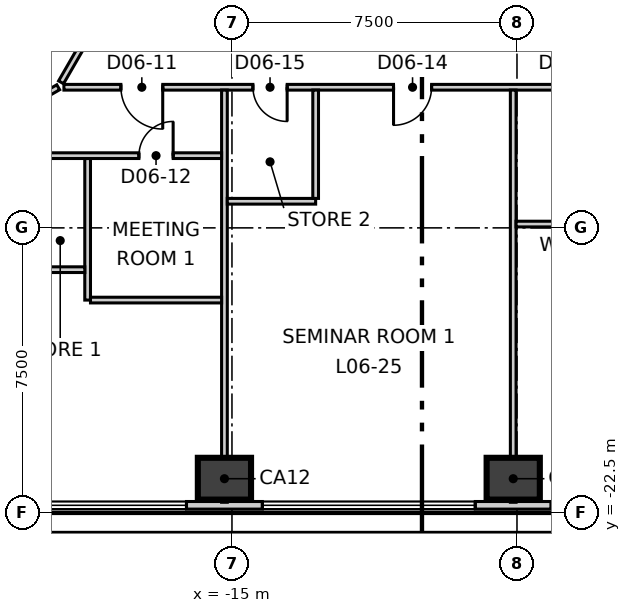
"""IFC4 building model, lengths in metres.
Left out: names, types, materials, properties, quantities, classifications, styles, units other than length and angle.
Written with IfcOpenShell. Run it as: python <this file> out.ifc"""

import sys

from ifc_helpers import new_model, si_unit, direction, frame, frame_2d, origin, origin_2d, place, context, subcontext, project, spatial, rectangle, extrude, element, fill, save


model = new_model("IFC4")
c1 = context("Model", 3, precision=1e-05, world=origin(), true_north=direction((0.0, 1.0)))
c2 = subcontext(c1, "Body", "Model", "MODEL_VIEW")
j1 = project(units=[si_unit("LENGTHUNIT", "METRE"), si_unit("PLANEANGLEUNIT", "RADIAN")], contexts=[c1])
p1 = place(None, origin())
s1 = spatial("IfcSite", under=j1, at=p1, CompositionType="ELEMENT")
p2 = place(p1, origin())
s2 = spatial("IfcBuilding", under=s1, at=p2, CompositionType="ELEMENT")
p3 = place(p2, frame((0.0, 0.0, 35.3)))
s3 = spatial("IfcBuildingStorey", under=s2, at=p3, CompositionType="ELEMENT", Elevation=35.3)
for number, where, z_axis, x_axis in (
    (1, (-15.198, -21.6, -0.3), (0.0, 0.0, 1.0), (1.0, 0.0, 0.0)),
    (2, (-7.599, -21.6, -0.3), (0.0, 0.0, 1.0), (1.0, 0.0, 0.0)),
):
    element("IfcColumn", number, at=place(p3, frame(where, z_axis=z_axis, x_axis=x_axis)), inside=s3, PredefinedType="COLUMN", context=c2, shape_type="SweptSolid", body=[
        extrude(rectangle(XDim=1.4, YDim=1.1, at=origin_2d()), origin(), (0.0, 0.0, 1.0), 4.0),
    ])
p4 = place(p3, frame((-3.462, 38.603, 0.0), z_axis=(0.0, 0.0, 1.0), x_axis=(-0.500012207976, -0.866018355391, 0.0)))
e3 = element("IfcWall", 3, at=p4, inside=s3, PredefinedType="ELEMENTEDWALL", context=c2, shape_type="SweptSolid", body=[
    extrude(rectangle(XDim=63.381, YDim=0.2, at=frame_2d((31.69, 0.0))), origin(), (0.0, 0.0, 1.0), 3.7),
])
p5 = place(p4, frame((2.302, 0.0, 0.9)))
e4 = element("IfcOpeningElement", 4, at=p5, cuts=e3, PredefinedType="OPENING", context=c2, shape_type="SweptSolid", body=[
    extrude(rectangle(XDim=5.6, YDim=2.5, at=frame_2d((2.8, 1.25))), frame((0.0, 0.11, 0.0), z_axis=(0.0, -1.0, 0.0), x_axis=(1.0, 0.0, 0.0)), (0.0, 0.0, 1.0), 0.22),
])
p6 = place(p4, frame((9.902, 0.0, 0.9)))
e5 = element("IfcOpeningElement", 5, at=p6, cuts=e3, PredefinedType="OPENING", context=c2, shape_type="SweptSolid", body=[
    extrude(rectangle(XDim=5.6, YDim=2.5, at=frame_2d((2.8, 1.25))), frame((0.0, 0.11, 0.0), z_axis=(0.0, -1.0, 0.0), x_axis=(1.0, 0.0, 0.0)), (0.0, 0.0, 1.0), 0.22),
])
p7 = place(p4, frame((17.501, 0.0, 0.9)))
e6 = element("IfcOpeningElement", 6, at=p7, cuts=e3, PredefinedType="OPENING", context=c2, shape_type="SweptSolid", body=[
    extrude(rectangle(XDim=5.6, YDim=2.5, at=frame_2d((2.8, 1.25))), frame((0.0, 0.11, 0.0), z_axis=(0.0, -1.0, 0.0), x_axis=(1.0, 0.0, 0.0)), (0.0, 0.0, 1.0), 0.22),
])
p8 = place(p4, frame((25.1, 0.0, 0.9)))
e7 = element("IfcOpeningElement", 7, at=p8, cuts=e3, PredefinedType="OPENING", context=c2, shape_type="SweptSolid", body=[
    extrude(rectangle(XDim=5.6, YDim=2.5, at=frame_2d((2.8, 1.25))), frame((0.0, 0.11, 0.0), z_axis=(0.0, -1.0, 0.0), x_axis=(1.0, 0.0, 0.0)), (0.0, 0.0, 1.0), 0.22),
])
p9 = place(p4, frame((32.7, 0.0, 0.9)))
e8 = element("IfcOpeningElement", 8, at=p9, cuts=e3, PredefinedType="OPENING", context=c2, shape_type="SweptSolid", body=[
    extrude(rectangle(XDim=5.6, YDim=2.5, at=frame_2d((2.8, 1.25))), frame((0.0, 0.11, 0.0), z_axis=(0.0, -1.0, 0.0), x_axis=(1.0, 0.0, 0.0)), (0.0, 0.0, 1.0), 0.22),
])
p10 = place(p4, frame((40.299, 0.0, 0.9)))
e9 = element("IfcOpeningElement", 9, at=p10, cuts=e3, PredefinedType="OPENING", context=c2, shape_type="SweptSolid", body=[
    extrude(rectangle(XDim=5.6, YDim=2.5, at=frame_2d((2.8, 1.25))), frame((0.0, 0.11, 0.0), z_axis=(0.0, -1.0, 0.0), x_axis=(1.0, 0.0, 0.0)), (0.0, 0.0, 1.0), 0.22),
])
p11 = place(p4, frame((47.899, 0.0, 0.9)))
e10 = element("IfcOpeningElement", 10, at=p11, cuts=e3, PredefinedType="OPENING", context=c2, shape_type="SweptSolid", body=[
    extrude(rectangle(XDim=5.6, YDim=2.5, at=frame_2d((2.8, 1.25))), frame((0.0, 0.11, 0.0), z_axis=(0.0, -1.0, 0.0), x_axis=(1.0, 0.0, 0.0)), (0.0, 0.0, 1.0), 0.22),
])
p12 = place(p4, frame((55.498, 0.0, 0.9)))
e11 = element("IfcOpeningElement", 11, at=p12, cuts=e3, PredefinedType="OPENING", context=c2, shape_type="SweptSolid", body=[
    extrude(rectangle(XDim=5.6, YDim=2.5, at=frame_2d((2.8, 1.25))), frame((0.0, 0.11, 0.0), z_axis=(0.0, -1.0, 0.0), x_axis=(1.0, 0.0, 0.0)), (0.0, 0.0, 1.0), 0.22),
])
p13 = place(p3, frame((-31.7, -22.3, 0.0), z_axis=(0.0, 0.0, 1.0), x_axis=(1.0, 0.0, 0.0)))
e12 = element("IfcWall", 12, at=p13, inside=s3, PredefinedType="ELEMENTEDWALL", context=c2, shape_type="SweptSolid", body=[
    extrude(rectangle(XDim=63.38, YDim=0.2, at=frame_2d((31.69, 0.0))), origin(), (0.0, 0.0, 1.0), 3.7),
])
p14 = place(p13, frame((2.303, 0.0, 0.9)))
e13 = element("IfcOpeningElement", 13, at=p14, cuts=e12, PredefinedType="OPENING", context=c2, shape_type="SweptSolid", body=[
    extrude(rectangle(XDim=5.6, YDim=2.5, at=frame_2d((2.8, 1.25))), frame((0.0, 0.11, 0.0), z_axis=(0.0, -1.0, 0.0), x_axis=(1.0, 0.0, 0.0)), (0.0, 0.0, 1.0), 0.22),
])
p15 = place(p13, frame((9.902, 0.0, 0.9)))
e14 = element("IfcOpeningElement", 14, at=p15, cuts=e12, PredefinedType="OPENING", context=c2, shape_type="SweptSolid", body=[
    extrude(rectangle(XDim=5.6, YDim=2.5, at=frame_2d((2.8, 1.25))), frame((0.0, 0.11, 0.0), z_axis=(0.0, -1.0, 0.0), x_axis=(1.0, 0.0, 0.0)), (0.0, 0.0, 1.0), 0.22),
])
p16 = place(p13, frame((17.501, 0.0, 0.9)))
e15 = element("IfcOpeningElement", 15, at=p16, cuts=e12, PredefinedType="OPENING", context=c2, shape_type="SweptSolid", body=[
    extrude(rectangle(XDim=5.6, YDim=2.5, at=frame_2d((2.8, 1.25))), frame((0.0, 0.11, 0.0), z_axis=(0.0, -1.0, 0.0), x_axis=(1.0, 0.0, 0.0)), (0.0, 0.0, 1.0), 0.22),
])
p17 = place(p13, frame((25.1, 0.0, 0.9)))
e16 = element("IfcOpeningElement", 16, at=p17, cuts=e12, PredefinedType="OPENING", context=c2, shape_type="SweptSolid", body=[
    extrude(rectangle(XDim=5.6, YDim=2.5, at=frame_2d((2.8, 1.25))), frame((0.0, 0.11, 0.0), z_axis=(0.0, -1.0, 0.0), x_axis=(1.0, 0.0, 0.0)), (0.0, 0.0, 1.0), 0.22),
])
p18 = place(p13, frame((32.7, 0.0, 0.9)))
e17 = element("IfcOpeningElement", 17, at=p18, cuts=e12, PredefinedType="OPENING", context=c2, shape_type="SweptSolid", body=[
    extrude(rectangle(XDim=5.6, YDim=2.5, at=frame_2d((2.8, 1.25))), frame((0.0, 0.11, 0.0), z_axis=(0.0, -1.0, 0.0), x_axis=(1.0, 0.0, 0.0)), (0.0, 0.0, 1.0), 0.22),
])
p19 = place(p13, frame((40.299, 0.0, 0.9)))
e18 = element("IfcOpeningElement", 18, at=p19, cuts=e12, PredefinedType="OPENING", context=c2, shape_type="SweptSolid", body=[
    extrude(rectangle(XDim=5.6, YDim=2.5, at=frame_2d((2.8, 1.25))), frame((0.0, 0.11, 0.0), z_axis=(0.0, -1.0, 0.0), x_axis=(1.0, 0.0, 0.0)), (0.0, 0.0, 1.0), 0.22),
])
p20 = place(p13, frame((47.898, 0.0, 0.9)))
e19 = element("IfcOpeningElement", 19, at=p20, cuts=e12, PredefinedType="OPENING", context=c2, shape_type="SweptSolid", body=[
    extrude(rectangle(XDim=5.6, YDim=2.5, at=frame_2d((2.8, 1.25))), frame((0.0, 0.11, 0.0), z_axis=(0.0, -1.0, 0.0), x_axis=(1.0, 0.0, 0.0)), (0.0, 0.0, 1.0), 0.22),
])
p21 = place(p13, frame((55.497, 0.0, 0.9)))
e20 = element("IfcOpeningElement", 20, at=p21, cuts=e12, PredefinedType="OPENING", context=c2, shape_type="SweptSolid", body=[
    extrude(rectangle(XDim=5.6, YDim=2.5, at=frame_2d((2.8, 1.25))), frame((0.0, 0.11, 0.0), z_axis=(0.0, -1.0, 0.0), x_axis=(1.0, 0.0, 0.0)), (0.0, 0.0, 1.0), 0.22),
])
p22 = place(p3, frame((-27.427, -15.835, 0.0), z_axis=(0.0, 0.0, 1.0), x_axis=(0.866033184421, 0.499986523299, 0.0)))
e21 = element("IfcWall", 21, at=p22, inside=s3, PredefinedType="PARTITIONING", context=c2, shape_type="SweptSolid", body=[
    extrude(rectangle(XDim=9.07, YDim=0.15, at=frame_2d((4.535, 0.0))), origin(), (0.0, 0.0, 1.0), 3.05),
])
p23 = place(p3, frame((-19.497, -11.17, 0.0), z_axis=(0.0, 0.0, 1.0), x_axis=(0.499998854553, 0.866026065108, 0.0)))
e22 = element("IfcWall", 22, at=p23, inside=s3, PredefinedType="PARTITIONING", context=c2, shape_type="SweptSolid", body=[
    extrude(rectangle(XDim=38.994, YDim=0.15, at=frame_2d((19.497, 0.0))), origin(), (0.0, 0.0, 1.0), 3.7),
])
p24 = place(p23, frame((36.244, 0.0, 0.0)))
e23 = element("IfcOpeningElement", 23, at=p24, cuts=e22, PredefinedType="OPENING", context=c2, shape_type="SweptSolid", body=[
    extrude(rectangle(XDim=1.1, YDim=2.1, at=frame_2d((0.55, 1.05))), frame((0.0, 0.085, 0.0), z_axis=(0.0, -1.0, 0.0), x_axis=(1.0, 0.0, 0.0)), (0.0, 0.0, 1.0), 0.17),
])
p25 = place(p23, frame((29.171, 0.0, 0.0)))
e24 = element("IfcOpeningElement", 24, at=p25, cuts=e22, PredefinedType="OPENING", context=c2, shape_type="SweptSolid", body=[
    extrude(rectangle(XDim=1.0, YDim=2.1, at=frame_2d((0.5, 1.05))), frame((0.0, 0.085, 0.0), z_axis=(0.0, -1.0, 0.0), x_axis=(1.0, 0.0, 0.0)), (0.0, 0.0, 1.0), 0.17),
])
p26 = place(p23, frame((32.971, 0.0, 0.0)))
e25 = element("IfcOpeningElement", 25, at=p26, cuts=e22, PredefinedType="OPENING", context=c2, shape_type="SweptSolid", body=[
    extrude(rectangle(XDim=0.9, YDim=2.1, at=frame_2d((0.45, 1.05))), frame((0.0, 0.085, 0.0), z_axis=(0.0, -1.0, 0.0), x_axis=(1.0, 0.0, 0.0)), (0.0, 0.0, 1.0), 0.17),
])
p27 = place(p23, frame((22.771, 0.0, 0.0)))
e26 = element("IfcOpeningElement", 26, at=p27, cuts=e22, PredefinedType="OPENING", context=c2, shape_type="SweptSolid", body=[
    extrude(rectangle(XDim=1.0, YDim=2.1, at=frame_2d((0.5, 1.05))), frame((0.0, 0.085, 0.0), z_axis=(0.0, -1.0, 0.0), x_axis=(1.0, 0.0, 0.0)), (0.0, 0.0, 1.0), 0.17),
])
p28 = place(p23, frame((6.872, 0.0, 0.0)))
e27 = element("IfcOpeningElement", 27, at=p28, cuts=e22, PredefinedType="OPENING", context=c2, shape_type="SweptSolid", body=[
    extrude(rectangle(XDim=1.1, YDim=2.1, at=frame_2d((0.55, 1.05))), frame((0.0, 0.085, 0.0), z_axis=(0.0, -1.0, 0.0), x_axis=(1.0, 0.0, 0.0)), (0.0, 0.0, 1.0), 0.17),
])
p29 = place(p23, frame((17.372, 0.0, 0.0)))
e28 = element("IfcOpeningElement", 28, at=p29, cuts=e22, PredefinedType="OPENING", context=c2, shape_type="SweptSolid", body=[
    extrude(rectangle(XDim=0.9, YDim=2.1, at=frame_2d((0.45, 1.05))), frame((0.0, 0.085, 0.0), z_axis=(0.0, -1.0, 0.0), x_axis=(1.0, 0.0, 0.0)), (0.0, 0.0, 1.0), 0.17),
])
p30 = place(p23, frame((14.172, 0.0, 0.0)))
e29 = element("IfcOpeningElement", 29, at=p30, cuts=e22, PredefinedType="OPENING", context=c2, shape_type="SweptSolid", body=[
    extrude(rectangle(XDim=0.9, YDim=2.1, at=frame_2d((0.45, 1.05))), frame((0.0, 0.085, 0.0), z_axis=(0.0, -1.0, 0.0), x_axis=(1.0, 0.0, 0.0)), (0.0, 0.0, 1.0), 0.17),
])
p31 = place(p23, frame((11.272, 0.0, 0.0)))
e30 = element("IfcOpeningElement", 30, at=p31, cuts=e22, PredefinedType="OPENING", context=c2, shape_type="SweptSolid", body=[
    extrude(rectangle(XDim=1.0, YDim=2.1, at=frame_2d((0.5, 1.05))), frame((0.0, 0.085, 0.0), z_axis=(0.0, -1.0, 0.0), x_axis=(1.0, 0.0, 0.0)), (0.0, 0.0, 1.0), 0.17),
])
p32 = place(p23, frame((1.473, 0.0, 0.0)))
e31 = element("IfcOpeningElement", 31, at=p32, cuts=e22, PredefinedType="OPENING", context=c2, shape_type="SweptSolid", body=[
    extrude(rectangle(XDim=1.1, YDim=2.1, at=frame_2d((0.55, 1.05))), frame((0.0, 0.085, 0.0), z_axis=(0.0, -1.0, 0.0), x_axis=(1.0, 0.0, 0.0)), (0.0, 0.0, 1.0), 0.17),
])
p33 = place(p3, frame((-19.422, -11.3, 0.0), z_axis=(0.0, 0.0, 1.0), x_axis=(1.0, 0.0, 0.0)))
e32 = element("IfcWall", 32, at=p33, inside=s3, PredefinedType="PARTITIONING", context=c2, shape_type="SweptSolid", body=[
    extrude(rectangle(XDim=38.994, YDim=0.15, at=frame_2d((19.497, 0.0))), origin(), (0.0, 0.0, 1.0), 3.7),
])
p34 = place(p33, frame((1.5, 0.0, 0.0)))
e33 = element("IfcOpeningElement", 33, at=p34, cuts=e32, PredefinedType="OPENING", context=c2, shape_type="SweptSolid", body=[
    extrude(rectangle(XDim=1.1, YDim=2.1, at=frame_2d((0.55, 1.05))), frame((0.0, 0.085, 0.0), z_axis=(0.0, -1.0, 0.0), x_axis=(1.0, 0.0, 0.0)), (0.0, 0.0, 1.0), 0.17),
])
p35 = place(p33, frame((8.674, 0.0, 0.0)))
e34 = element("IfcOpeningElement", 34, at=p35, cuts=e32, PredefinedType="OPENING", context=c2, shape_type="SweptSolid", body=[
    extrude(rectangle(XDim=1.0, YDim=2.1, at=frame_2d((0.5, 1.05))), frame((0.0, 0.085, 0.0), z_axis=(0.0, -1.0, 0.0), x_axis=(1.0, 0.0, 0.0)), (0.0, 0.0, 1.0), 0.17),
])
p36 = place(p33, frame((4.974, 0.0, 0.0)))
e35 = element("IfcOpeningElement", 35, at=p36, cuts=e32, PredefinedType="OPENING", context=c2, shape_type="SweptSolid", body=[
    extrude(rectangle(XDim=0.9, YDim=2.1, at=frame_2d((0.45, 1.05))), frame((0.0, 0.085, 0.0), z_axis=(0.0, -1.0, 0.0), x_axis=(1.0, 0.0, 0.0)), (0.0, 0.0, 1.0), 0.17),
])
p37 = place(p33, frame((23.273, 0.0, 0.0)))
e36 = element("IfcOpeningElement", 36, at=p37, cuts=e32, PredefinedType="OPENING", context=c2, shape_type="SweptSolid", body=[
    extrude(rectangle(XDim=1.1, YDim=2.1, at=frame_2d((0.55, 1.05))), frame((0.0, 0.085, 0.0), z_axis=(0.0, -1.0, 0.0), x_axis=(1.0, 0.0, 0.0)), (0.0, 0.0, 1.0), 0.17),
])
p38 = place(p33, frame((12.973, 0.0, 0.0)))
e37 = element("IfcOpeningElement", 37, at=p38, cuts=e32, PredefinedType="OPENING", context=c2, shape_type="SweptSolid", body=[
    extrude(rectangle(XDim=0.9, YDim=2.1, at=frame_2d((0.45, 1.05))), frame((0.0, 0.085, 0.0), z_axis=(0.0, -1.0, 0.0), x_axis=(1.0, 0.0, 0.0)), (0.0, 0.0, 1.0), 0.17),
])
p39 = place(p33, frame((16.173, 0.0, 0.0)))
e38 = element("IfcOpeningElement", 38, at=p39, cuts=e32, PredefinedType="OPENING", context=c2, shape_type="SweptSolid", body=[
    extrude(rectangle(XDim=0.9, YDim=2.1, at=frame_2d((0.45, 1.05))), frame((0.0, 0.085, 0.0), z_axis=(0.0, -1.0, 0.0), x_axis=(1.0, 0.0, 0.0)), (0.0, 0.0, 1.0), 0.17),
])
p40 = place(p33, frame((18.873, 0.0, 0.0)))
e39 = element("IfcOpeningElement", 39, at=p40, cuts=e32, PredefinedType="OPENING", context=c2, shape_type="SweptSolid", body=[
    extrude(rectangle(XDim=1.0, YDim=2.1, at=frame_2d((0.5, 1.05))), frame((0.0, 0.085, 0.0), z_axis=(0.0, -1.0, 0.0), x_axis=(1.0, 0.0, 0.0)), (0.0, 0.0, 1.0), 0.17),
])
p41 = place(p33, frame((32.471, 0.0, 0.0)))
e40 = element("IfcOpeningElement", 40, at=p41, cuts=e32, PredefinedType="OPENING", context=c2, shape_type="SweptSolid", body=[
    extrude(rectangle(XDim=1.0, YDim=2.1, at=frame_2d((0.5, 1.05))), frame((0.0, 0.085, 0.0), z_axis=(0.0, -1.0, 0.0), x_axis=(1.0, 0.0, 0.0)), (0.0, 0.0, 1.0), 0.17),
])
p42 = place(p3, frame((-15.198, -22.22, 0.0), z_axis=(0.0, 0.0, 1.0), x_axis=(0.0, 1.0, 0.0)))
e41 = element("IfcWall", 41, at=p42, inside=s3, PredefinedType="PARTITIONING", context=c2, shape_type="SweptSolid", body=[
    extrude(rectangle(XDim=10.845, YDim=0.15, at=frame_2d((5.422, 0.0))), origin(), (0.0, 0.0, 1.0), 3.7),
])
p43 = place(p3, frame((-15.123, -14.3, 0.0), z_axis=(0.0, 0.0, 1.0), x_axis=(1.0, 0.0, 0.0)))
e42 = element("IfcWall", 42, at=p43, inside=s3, PredefinedType="PARTITIONING", context=c2, shape_type="SweptSolid", body=[
    extrude(rectangle(XDim=2.325, YDim=0.15, at=frame_2d((1.163, 0.0))), origin(), (0.0, 0.0, 1.0), 3.7),
])
p44 = place(p3, frame((-12.798, -14.225, 0.0), z_axis=(0.0, 0.0, 1.0), x_axis=(0.0, 1.0, 0.0)))
e43 = element("IfcWall", 43, at=p44, inside=s3, PredefinedType="PARTITIONING", context=c2, shape_type="SweptSolid", body=[
    extrude(rectangle(XDim=2.85, YDim=0.15, at=frame_2d((1.425, 0.0))), origin(), (0.0, 0.0, 1.0), 3.7),
])
p45 = place(p3, frame((-7.599, -22.22, 0.0), z_axis=(0.0, 0.0, 1.0), x_axis=(0.0, 1.0, 0.0)))
e44 = element("IfcWall", 44, at=p45, inside=s3, PredefinedType="PARTITIONING", context=c2, shape_type="SweptSolid", body=[
    extrude(rectangle(XDim=10.845, YDim=0.15, at=frame_2d((5.422, 0.0))), origin(), (0.0, 0.0, 1.0), 3.7),
])
p46 = place(p3, frame((-7.524, -14.9, 0.0), z_axis=(0.0, 0.0, 1.0), x_axis=(1.0, 0.0, 0.0)))
e45 = element("IfcWall", 45, at=p46, inside=s3, PredefinedType="PARTITIONING", context=c2, shape_type="SweptSolid", body=[
    extrude(rectangle(XDim=8.725, YDim=0.15, at=frame_2d((4.362, 0.0))), origin(), (0.0, 0.0, 1.0), 3.7),
])
p47 = place(p3, frame((-18.798, -16.9, 0.0), z_axis=(0.0, 0.0, 1.0), x_axis=(0.0, 1.0, 0.0)))
e46 = element("IfcWall", 46, at=p47, inside=s3, PredefinedType="PARTITIONING", context=c2, shape_type="SweptSolid", body=[
    extrude(rectangle(XDim=3.725, YDim=0.15, at=frame_2d((1.862, 0.0))), origin(), (0.0, 0.0, 1.0), 3.7),
])
p48 = place(p3, frame((-20.998, -13.1, 0.0), z_axis=(0.0, 0.0, 1.0), x_axis=(1.0, 0.0, 0.0)))
e47 = element("IfcWall", 47, at=p48, inside=s3, PredefinedType="PARTITIONING", context=c2, shape_type="SweptSolid", body=[
    extrude(rectangle(XDim=5.725, YDim=0.15, at=frame_2d((2.863, 0.0))), origin(), (0.0, 0.0, 1.0), 3.7),
])
p49 = place(p48, frame((3.55, 0.0, 0.0)))
e48 = element("IfcOpeningElement", 48, at=p49, cuts=e47, PredefinedType="OPENING", context=c2, shape_type="SweptSolid", body=[
    extrude(rectangle(XDim=0.9, YDim=2.1, at=frame_2d((0.45, 1.05))), frame((0.0, 0.085, 0.0), z_axis=(0.0, -1.0, 0.0), x_axis=(1.0, 0.0, 0.0)), (0.0, 0.0, 1.0), 0.17),
])
p50 = place(p3, frame((-20.923, -16.1, 0.0), z_axis=(0.0, 0.0, 1.0), x_axis=(1.0, 0.0, 0.0)))
e49 = element("IfcWall", 49, at=p50, inside=s3, PredefinedType="PARTITIONING", context=c2, shape_type="SweptSolid", body=[
    extrude(rectangle(XDim=2.05, YDim=0.15, at=frame_2d((1.025, 0.0))), origin(), (0.0, 0.0, 1.0), 3.7),
])
p51 = place(p3, frame((-18.723, -16.9, 0.0), z_axis=(0.0, 0.0, 1.0), x_axis=(1.0, 0.0, 0.0)))
e50 = element("IfcWall", 50, at=p51, inside=s3, PredefinedType="PARTITIONING", context=c2, shape_type="SweptSolid", body=[
    extrude(rectangle(XDim=3.45, YDim=0.15, at=frame_2d((1.725, 0.0))), origin(), (0.0, 0.0, 1.0), 3.7),
])
p52 = place(p15, origin())
e51 = element("IfcWindow", 51, at=p52, inside=s3, PartitioningType="SINGLE_PANEL", PredefinedType="WINDOW", context=c2, shape_type="SweptSolid", body=[
    extrude(rectangle(XDim=5.6, YDim=2.5, at=frame_2d((2.8, 1.25))), frame((0.0, 0.03, 0.0), z_axis=(0.0, -1.0, 0.0), x_axis=(1.0, 0.0, 0.0)), (0.0, 0.0, 1.0), 0.06),
])
fill(e14, e51)
p53 = place(p16, origin())
e52 = element("IfcWindow", 52, at=p53, inside=s3, PartitioningType="SINGLE_PANEL", PredefinedType="WINDOW", context=c2, shape_type="SweptSolid", body=[
    extrude(rectangle(XDim=5.6, YDim=2.5, at=frame_2d((2.8, 1.25))), frame((0.0, 0.03, 0.0), z_axis=(0.0, -1.0, 0.0), x_axis=(1.0, 0.0, 0.0)), (0.0, 0.0, 1.0), 0.06),
])
fill(e15, e52)
p54 = place(p17, origin())
e53 = element("IfcWindow", 53, at=p54, inside=s3, PartitioningType="SINGLE_PANEL", PredefinedType="WINDOW", context=c2, shape_type="SweptSolid", body=[
    extrude(rectangle(XDim=5.6, YDim=2.5, at=frame_2d((2.8, 1.25))), frame((0.0, 0.03, 0.0), z_axis=(0.0, -1.0, 0.0), x_axis=(1.0, 0.0, 0.0)), (0.0, 0.0, 1.0), 0.06),
])
fill(e16, e53)
p55 = place(p34, origin())
e54 = element("IfcDoor", 54, at=p55, inside=s3, OperationType="SINGLE_SWING_RIGHT", PredefinedType="DOOR", context=c2, shape_type="SweptSolid", body=[
    extrude(rectangle(XDim=1.1, YDim=2.1, at=frame_2d((0.55, 1.05))), frame((0.0, 0.025, 0.0), z_axis=(0.0, -1.0, 0.0), x_axis=(1.0, 0.0, 0.0)), (0.0, 0.0, 1.0), 0.05),
])
fill(e33, e54)
p56 = place(p49, origin())
e55 = element("IfcDoor", 55, at=p56, inside=s3, OperationType="SINGLE_SWING_LEFT", PredefinedType="DOOR", context=c2, shape_type="SweptSolid", body=[
    extrude(rectangle(XDim=0.9, YDim=2.1, at=frame_2d((0.45, 1.05))), frame((0.0, 0.025, 0.0), z_axis=(0.0, -1.0, 0.0), x_axis=(1.0, 0.0, 0.0)), (0.0, 0.0, 1.0), 0.05),
])
fill(e48, e55)
p57 = place(p35, origin())
e56 = element("IfcDoor", 56, at=p57, inside=s3, OperationType="SINGLE_SWING_LEFT", PredefinedType="DOOR", context=c2, shape_type="SweptSolid", body=[
    extrude(rectangle(XDim=1.0, YDim=2.1, at=frame_2d((0.5, 1.05))), frame((0.0, 0.025, 0.0), z_axis=(0.0, -1.0, 0.0), x_axis=(1.0, 0.0, 0.0)), (0.0, 0.0, 1.0), 0.05),
])
fill(e34, e56)
p58 = place(p36, origin())
e57 = element("IfcDoor", 57, at=p58, inside=s3, OperationType="SINGLE_SWING_RIGHT", PredefinedType="DOOR", context=c2, shape_type="SweptSolid", body=[
    extrude(rectangle(XDim=0.9, YDim=2.1, at=frame_2d((0.45, 1.05))), frame((0.0, 0.025, 0.0), z_axis=(0.0, -1.0, 0.0), x_axis=(1.0, 0.0, 0.0)), (0.0, 0.0, 1.0), 0.05),
])
fill(e35, e57)
save(model, sys.argv[1])
